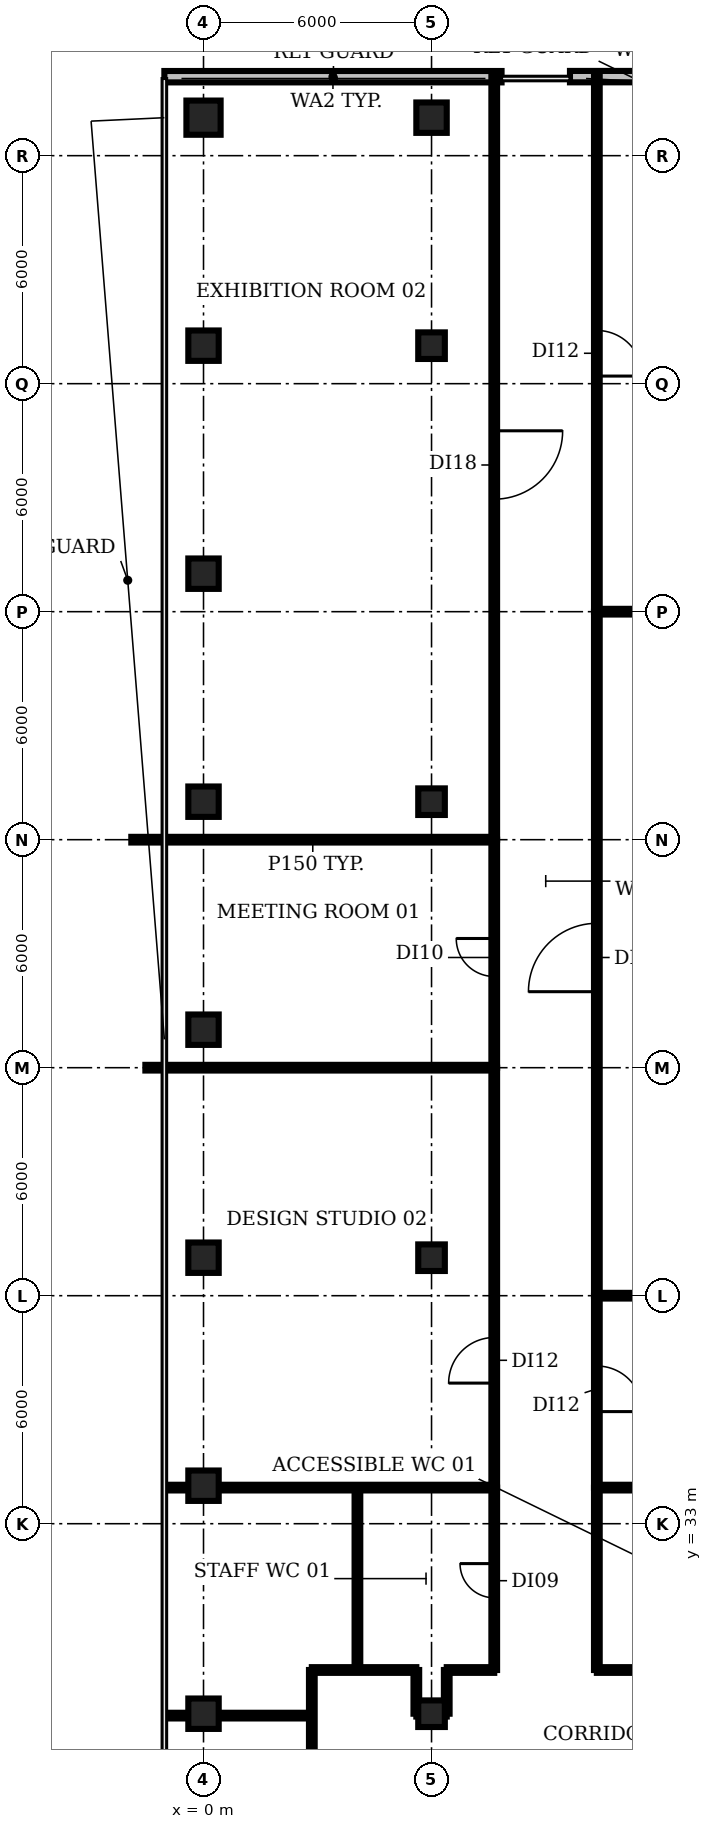
"""IFC4 building model, lengths in metres.
Left out: names, types, materials, properties, quantities, classifications, styles, units other than length and angle.
Written with IfcOpenShell. Run it as: python <this file> out.ifc"""

import sys

from ifc_helpers import new_model, si_unit, direction, frame, frame_2d, origin, origin_2d, place, context, subcontext, project, spatial, rectangle, circle, extrude, element, fill, save


model = new_model("IFC4")
c1 = context("Model", 3, precision=1e-05, world=origin(), true_north=direction((0.0, 1.0)))
c2 = subcontext(c1, "Body", "Model", "MODEL_VIEW")
j1 = project(units=[si_unit("LENGTHUNIT", "METRE"), si_unit("PLANEANGLEUNIT", "RADIAN")], contexts=[c1])
p1 = place(None, origin())
s1 = spatial("IfcSite", under=j1, at=p1, CompositionType="ELEMENT")
p2 = place(p1, origin())
s2 = spatial("IfcBuilding", under=s1, at=p2, CompositionType="ELEMENT")
p3 = place(p2, frame((0.0, 0.0, 213.8)))
s3 = spatial("IfcBuildingStorey", under=s2, at=p3, CompositionType="ELEMENT", Elevation=213.8)
for number, where, z_axis, x_axis in (
    (1, (0.0, 28.0, 0.0), (0.0, 0.0, 1.0), (1.0, 0.0, 0.0)),
    (2, (0.0, 34.0, 0.0), (0.0, 0.0, 1.0), (1.0, 0.0, 0.0)),
    (3, (0.0, 40.0, 0.0), (0.0, 0.0, 1.0), (1.0, 0.0, 0.0)),
    (4, (0.0, 46.0, 0.0), (0.0, 0.0, 1.0), (1.0, 0.0, 0.0)),
    (5, (0.0, 52.0, 0.0), (0.0, 0.0, 1.0), (1.0, 0.0, 0.0)),
    (6, (0.0, 58.0, 0.0), (0.0, 0.0, 1.0), (1.0, 0.0, 0.0)),
    (7, (0.0, 64.0, 0.0), (0.0, 0.0, 1.0), (1.0, 0.0, 0.0)),
):
    element("IfcColumn", number, at=place(p3, frame(where, z_axis=z_axis, x_axis=x_axis)), inside=s3, PredefinedType="COLUMN", context=c2, shape_type="SweptSolid", body=[
        extrude(rectangle(XDim=0.8, YDim=0.8, at=origin_2d()), origin(), (0.0, 0.0, 1.0), 3.85),
    ])
p4 = place(p3, frame((0.0, 70.0, 0.0), z_axis=(0.0, 0.0, 1.0), x_axis=(1.0, 0.0, 0.0)))
e8 = element("IfcColumn", 8, at=p4, inside=s3, PredefinedType="COLUMN", context=c2, shape_type="SweptSolid", body=[
    extrude(circle(Radius=0.45, at=origin_2d()), origin(), (0.0, 0.0, 1.0), 3.85),
])
for number, where, z_axis, x_axis in (
    (9, (6.0, 28.0, 0.0), (0.0, 0.0, 1.0), (1.0, 0.0, 0.0)),
    (10, (6.0, 40.0, 0.0), (0.0, 0.0, 1.0), (1.0, 0.0, 0.0)),
    (11, (6.0, 52.0, 0.0), (0.0, 0.0, 1.0), (1.0, 0.0, 0.0)),
    (12, (6.0, 64.0, 0.0), (0.0, 0.0, 1.0), (1.0, 0.0, 0.0)),
):
    element("IfcColumn", number, at=place(p3, frame(where, z_axis=z_axis, x_axis=x_axis)), inside=s3, PredefinedType="COLUMN", context=c2, shape_type="SweptSolid", body=[
        extrude(rectangle(XDim=0.7, YDim=0.7, at=origin_2d()), origin(), (0.0, 0.0, 1.0), 3.85),
    ])
p5 = place(p3, frame((6.0, 70.0, 0.0), z_axis=(0.0, 0.0, 1.0), x_axis=(1.0, 0.0, 0.0)))
e13 = element("IfcColumn", 13, at=p5, inside=s3, PredefinedType="COLUMN", context=c2, shape_type="SweptSolid", body=[
    extrude(rectangle(XDim=0.8, YDim=0.8, at=origin_2d()), origin(), (0.0, 0.0, 1.0), 3.85),
])
p6 = place(p3, frame((14.357, 71.08, 0.0), z_axis=(0.0, 0.0, 1.0), x_axis=(-1.0, 0.0, 0.0)))
e14 = element("IfcWall", 14, at=p6, inside=s3, PredefinedType="SOLIDWALL", context=c2, shape_type="SweptSolid", body=[
    extrude(rectangle(XDim=4.715, YDim=0.3, at=frame_2d((2.357, 0.0))), origin(), (0.0, 0.0, 1.0), 3.85),
])
p7 = place(p3, frame((7.843, 71.078, 0.0), z_axis=(0.0, 0.0, 1.0), x_axis=(-1.0, 0.0, 0.0)))
e15 = element("IfcWall", 15, at=p7, inside=s3, PredefinedType="SOLIDWALL", context=c2, shape_type="SweptSolid", body=[
    extrude(rectangle(XDim=8.873, YDim=0.3, at=frame_2d((4.436, 0.0))), origin(), (0.0, 0.0, 1.0), 3.85),
])
p8 = place(p3, frame((-1.9, 51.0, 0.0), z_axis=(0.0, 0.0, 1.0), x_axis=(1.0, 0.0, 0.0)))
e16 = element("IfcWall", 16, at=p8, inside=s3, PredefinedType="PARTITIONING", context=c2, shape_type="SweptSolid", body=[
    extrude(rectangle(XDim=9.55, YDim=0.15, at=frame_2d((4.775, 0.0))), origin(), (0.0, 0.0, 1.0), 2.88),
])
p9 = place(p3, frame((-1.53, 45.0, 0.0), z_axis=(0.0, 0.0, 1.0), x_axis=(1.0, 0.0, 0.0)))
e17 = element("IfcWall", 17, at=p9, inside=s3, PredefinedType="PARTITIONING", context=c2, shape_type="SweptSolid", body=[
    extrude(rectangle(XDim=9.18, YDim=0.15, at=frame_2d((4.59, 0.0))), origin(), (0.0, 0.0, 1.0), 2.88),
])
p10 = place(p3, frame((-0.965, 27.95, 0.0), z_axis=(0.0, 0.0, 1.0), x_axis=(1.0, 0.0, 0.0)))
e18 = element("IfcWall", 18, at=p10, inside=s3, PredefinedType="PARTITIONING", context=c2, shape_type="SweptSolid", body=[
    extrude(rectangle(XDim=3.815, YDim=0.15, at=frame_2d((1.908, 0.0))), origin(), (0.0, 0.0, 1.0), 2.88),
])
p11 = place(p3, frame((-0.98, 33.95, 0.0), z_axis=(0.0, 0.0, 1.0), x_axis=(1.0, 0.0, 0.0)))
e19 = element("IfcWall", 19, at=p11, inside=s3, PredefinedType="PARTITIONING", context=c2, shape_type="SweptSolid", body=[
    extrude(rectangle(XDim=8.63, YDim=0.15, at=frame_2d((4.315, 0.0))), origin(), (0.0, 0.0, 1.0), 2.88),
])
p12 = place(p3, frame((2.85, 25.25, 0.0), z_axis=(0.0, 0.0, 1.0), x_axis=(0.0, 1.0, 0.0)))
e20 = element("IfcWall", 20, at=p12, inside=s3, PredefinedType="PARTITIONING", context=c2, shape_type="SweptSolid", body=[
    extrude(rectangle(XDim=3.9, YDim=0.15, at=frame_2d((1.95, 0.0))), origin(), (0.0, 0.0, 1.0), 2.88),
])
p13 = place(p3, frame((2.85, 29.15, 0.0), z_axis=(0.0, 0.0, 1.0), x_axis=(1.0, 0.0, 0.0)))
e21 = element("IfcWall", 21, at=p13, inside=s3, PredefinedType="PARTITIONING", context=c2, shape_type="SweptSolid", body=[
    extrude(rectangle(XDim=2.75, YDim=0.15, at=frame_2d((1.375, 0.0))), origin(), (0.0, 0.0, 1.0), 2.88),
])
p14 = place(p3, frame((4.05, 29.15, 0.0), z_axis=(0.0, 0.0, 1.0), x_axis=(0.0, 1.0, 0.0)))
e22 = element("IfcWall", 22, at=p14, inside=s3, PredefinedType="PARTITIONING", context=c2, shape_type="SweptSolid", body=[
    extrude(rectangle(XDim=4.8, YDim=0.15, at=frame_2d((2.4, 0.0))), origin(), (0.0, 0.0, 1.0), 2.88),
])
p15 = place(p3, frame((5.6, 28.0, 0.0), z_axis=(0.0, 0.0, 1.0), x_axis=(0.0, 1.0, 0.0)))
e23 = element("IfcWall", 23, at=p15, inside=s3, PredefinedType="PARTITIONING", context=c2, shape_type="SweptSolid", body=[
    extrude(rectangle(XDim=1.15, YDim=0.15, at=frame_2d((0.575, 0.0))), origin(), (0.0, 0.0, 1.0), 2.88),
])
p16 = place(p3, frame((5.6, 28.0, 0.0), z_axis=(0.0, 0.0, 1.0), x_axis=(1.0, 0.0, 0.0)))
e24 = element("IfcWall", 24, at=p16, inside=s3, PredefinedType="PARTITIONING", context=c2, shape_type="SweptSolid", body=[
    extrude(rectangle(XDim=0.8, YDim=0.15, at=frame_2d((0.4, 0.0))), origin(), (0.0, 0.0, 1.0), 2.88),
])
p17 = place(p3, frame((6.4, 28.0, 0.0), z_axis=(0.0, 0.0, 1.0), x_axis=(0.0, 1.0, 0.0)))
e25 = element("IfcWall", 25, at=p17, inside=s3, PredefinedType="PARTITIONING", context=c2, shape_type="SweptSolid", body=[
    extrude(rectangle(XDim=1.15, YDim=0.15, at=frame_2d((0.575, 0.0))), origin(), (0.0, 0.0, 1.0), 2.88),
])
p18 = place(p3, frame((6.4, 29.15, 0.0), z_axis=(0.0, 0.0, 1.0), x_axis=(1.0, 0.0, 0.0)))
e26 = element("IfcWall", 26, at=p18, inside=s3, PredefinedType="PARTITIONING", context=c2, shape_type="SweptSolid", body=[
    extrude(rectangle(XDim=1.25, YDim=0.15, at=frame_2d((0.625, 0.0))), origin(), (0.0, 0.0, 1.0), 2.88),
])
p19 = place(p3, frame((7.65, 29.15, 0.0), z_axis=(0.0, 0.0, 1.0), x_axis=(0.0, 1.0, 0.0)))
e27 = element("IfcWall", 27, at=p19, inside=s3, PredefinedType="PARTITIONING", context=c2, shape_type="SweptSolid", body=[
    extrude(rectangle(XDim=4.8, YDim=0.15, at=frame_2d((2.4, 0.0))), origin(), (0.0, 0.0, 1.0), 2.88),
])
p20 = place(p19, frame((1.9, 0.0, 0.0)))
e28 = element("IfcOpeningElement", 28, at=p20, cuts=e27, PredefinedType="OPENING", context=c2, shape_type="SweptSolid", body=[
    extrude(rectangle(XDim=0.9, YDim=2.1, at=frame_2d((0.45, 1.05))), frame((0.0, 0.085, 0.0), z_axis=(0.0, -1.0, 0.0), x_axis=(1.0, 0.0, 0.0)), (0.0, 0.0, 1.0), 0.17),
])
p21 = place(p3, frame((7.65, 33.95, 0.0), z_axis=(0.0, 0.0, 1.0), x_axis=(0.0, 1.0, 0.0)))
e29 = element("IfcWall", 29, at=p21, inside=s3, PredefinedType="PARTITIONING", context=c2, shape_type="SweptSolid", body=[
    extrude(rectangle(XDim=11.05, YDim=0.15, at=frame_2d((5.525, 0.0))), origin(), (0.0, 0.0, 1.0), 2.88),
])
p22 = place(p21, frame((2.75, 0.0, 0.0)))
e30 = element("IfcOpeningElement", 30, at=p22, cuts=e29, PredefinedType="OPENING", context=c2, shape_type="SweptSolid", body=[
    extrude(rectangle(XDim=1.2, YDim=2.1, at=frame_2d((0.6, 1.05))), frame((0.0, 0.085, 0.0), z_axis=(0.0, -1.0, 0.0), x_axis=(1.0, 0.0, 0.0)), (0.0, 0.0, 1.0), 0.17),
])
p23 = place(p3, frame((7.65, 45.0, 0.0), z_axis=(0.0, 0.0, 1.0), x_axis=(0.0, 1.0, 0.0)))
e31 = element("IfcWall", 31, at=p23, inside=s3, PredefinedType="PARTITIONING", context=c2, shape_type="SweptSolid", body=[
    extrude(rectangle(XDim=6.0, YDim=0.15, at=frame_2d((3.0, 0.0))), origin(), (0.0, 0.0, 1.0), 2.88),
])
p24 = place(p23, frame((2.4, 0.0, 0.0)))
e32 = element("IfcOpeningElement", 32, at=p24, cuts=e31, PredefinedType="OPENING", context=c2, shape_type="SweptSolid", body=[
    extrude(rectangle(XDim=1.0, YDim=2.1, at=frame_2d((0.5, 1.05))), frame((0.0, 0.085, 0.0), z_axis=(0.0, -1.0, 0.0), x_axis=(1.0, 0.0, 0.0)), (0.0, 0.0, 1.0), 0.17),
])
p25 = place(p3, frame((7.65, 71.09, 0.0), z_axis=(0.0, 0.0, 1.0), x_axis=(0.0, -1.0, 0.0)))
e33 = element("IfcWall", 33, at=p25, inside=s3, PredefinedType="PARTITIONING", context=c2, shape_type="SweptSolid", body=[
    extrude(rectangle(XDim=20.09, YDim=0.15, at=frame_2d((10.045, 0.0))), origin(), (0.0, 0.0, 1.0), 2.88),
])
p26 = place(p25, frame((9.33, 0.0, 0.0)))
e34 = element("IfcOpeningElement", 34, at=p26, cuts=e33, PredefinedType="OPENING", context=c2, shape_type="SweptSolid", body=[
    extrude(rectangle(XDim=1.8, YDim=2.1, at=frame_2d((0.9, 1.05))), frame((0.0, 0.085, 0.0), z_axis=(0.0, -1.0, 0.0), x_axis=(1.0, 0.0, 0.0)), (0.0, 0.0, 1.0), 0.17),
])
p27 = place(p3, frame((10.35, 29.15, 0.0), z_axis=(0.0, 0.0, 1.0), x_axis=(0.0, 1.0, 0.0)))
e35 = element("IfcWall", 35, at=p27, inside=s3, PredefinedType="PARTITIONING", context=c2, shape_type="SweptSolid", body=[
    extrude(rectangle(XDim=4.8, YDim=0.15, at=frame_2d((2.4, 0.0))), origin(), (0.0, 0.0, 1.0), 2.88),
])
p28 = place(p3, frame((10.35, 29.15, 0.0), z_axis=(0.0, 0.0, 1.0), x_axis=(1.0, 0.0, 0.0)))
e36 = element("IfcWall", 36, at=p28, inside=s3, PredefinedType="PARTITIONING", context=c2, shape_type="SweptSolid", body=[
    extrude(rectangle(XDim=1.25, YDim=0.15, at=frame_2d((0.625, 0.0))), origin(), (0.0, 0.0, 1.0), 2.88),
])
p29 = place(p3, frame((10.35, 33.95, 0.0), z_axis=(0.0, 0.0, 1.0), x_axis=(1.0, 0.0, 0.0)))
e37 = element("IfcWall", 37, at=p29, inside=s3, PredefinedType="PARTITIONING", context=c2, shape_type="SweptSolid", body=[
    extrude(rectangle(XDim=1.242, YDim=0.15, at=frame_2d((0.621, 0.0))), origin(), (0.0, 0.0, 1.0), 2.88),
])
p30 = place(p3, frame((10.35, 39.0, 0.0), z_axis=(0.0, 0.0, 1.0), x_axis=(0.0, -1.0, 0.0)))
e38 = element("IfcWall", 38, at=p30, inside=s3, PredefinedType="PARTITIONING", context=c2, shape_type="SweptSolid", body=[
    extrude(rectangle(XDim=5.05, YDim=0.15, at=frame_2d((2.525, 0.0))), origin(), (0.0, 0.0, 1.0), 2.88),
])
p31 = place(p30, frame((1.85, 0.0, 0.0)))
e39 = element("IfcOpeningElement", 39, at=p31, cuts=e38, PredefinedType="OPENING", context=c2, shape_type="SweptSolid", body=[
    extrude(rectangle(XDim=1.2, YDim=2.1, at=frame_2d((0.6, 1.05))), frame((0.0, 0.085, 0.0), z_axis=(0.0, -1.0, 0.0), x_axis=(1.0, 0.0, 0.0)), (0.0, 0.0, 1.0), 0.17),
])
p32 = place(p3, frame((10.35, 39.0, 0.0), z_axis=(0.0, 0.0, 1.0), x_axis=(0.0, 1.0, 0.0)))
e40 = element("IfcWall", 40, at=p32, inside=s3, PredefinedType="PARTITIONING", context=c2, shape_type="SweptSolid", body=[
    extrude(rectangle(XDim=18.0, YDim=0.15, at=frame_2d((9.0, 0.0))), origin(), (0.0, 0.0, 1.0), 2.88),
])
p33 = place(p32, frame((8.0, 0.0, 0.0)))
e41 = element("IfcOpeningElement", 41, at=p33, cuts=e40, PredefinedType="OPENING", context=c2, shape_type="SweptSolid", body=[
    extrude(rectangle(XDim=1.8, YDim=2.1, at=frame_2d((0.9, 1.05))), frame((0.0, 0.085, 0.0), z_axis=(0.0, -1.0, 0.0), x_axis=(1.0, 0.0, 0.0)), (0.0, 0.0, 1.0), 0.17),
])
for number, where, z_axis, x_axis in (
    (42, (10.35, 39.0, 0.0), (0.0, 0.0, 1.0), (1.0, 0.0, 0.0)),
    (43, (10.35, 57.0, 0.0), (0.0, 0.0, 1.0), (1.0, 0.0, 0.0)),
):
    element("IfcWall", number, at=place(p3, frame(where, z_axis=z_axis, x_axis=x_axis)), inside=s3, PredefinedType="PARTITIONING", context=c2, shape_type="SweptSolid", body=[
        extrude(rectangle(XDim=14.63, YDim=0.15, at=frame_2d((7.315, 0.0))), origin(), (0.0, 0.0, 1.0), 2.88),
    ])
p34 = place(p3, frame((10.35, 71.09, 0.0), z_axis=(0.0, 0.0, 1.0), x_axis=(0.0, -1.0, 0.0)))
e44 = element("IfcWall", 44, at=p34, inside=s3, PredefinedType="PARTITIONING", context=c2, shape_type="SweptSolid", body=[
    extrude(rectangle(XDim=14.09, YDim=0.15, at=frame_2d((7.045, 0.0))), origin(), (0.0, 0.0, 1.0), 2.88),
])
p35 = place(p34, frame((6.69, 0.0, 0.0)))
e45 = element("IfcOpeningElement", 45, at=p35, cuts=e44, PredefinedType="OPENING", context=c2, shape_type="SweptSolid", body=[
    extrude(rectangle(XDim=1.2, YDim=2.1, at=frame_2d((0.6, 1.05))), frame((0.0, 0.085, 0.0), z_axis=(0.0, -1.0, 0.0), x_axis=(1.0, 0.0, 0.0)), (0.0, 0.0, 1.0), 0.17),
])
p36 = place(p20, origin())
e46 = element("IfcDoor", 46, at=p36, inside=s3, OperationType="SINGLE_SWING_RIGHT", PredefinedType="DOOR", context=c2, shape_type="SweptSolid", body=[
    extrude(rectangle(XDim=0.9, YDim=2.1, at=frame_2d((0.45, 1.05))), frame((0.0, 0.025, 0.0), z_axis=(0.0, -1.0, 0.0), x_axis=(1.0, 0.0, 0.0)), (0.0, 0.0, 1.0), 0.05),
])
fill(e28, e46)
p37 = place(p22, origin())
e47 = element("IfcDoor", 47, at=p37, inside=s3, OperationType="SINGLE_SWING_LEFT", PredefinedType="DOOR", context=c2, shape_type="SweptSolid", body=[
    extrude(rectangle(XDim=1.2, YDim=2.1, at=frame_2d((0.6, 1.05))), frame((0.0, 0.025, 0.0), z_axis=(0.0, -1.0, 0.0), x_axis=(1.0, 0.0, 0.0)), (0.0, 0.0, 1.0), 0.05),
])
fill(e30, e47)
p38 = place(p24, origin())
e48 = element("IfcDoor", 48, at=p38, inside=s3, OperationType="SINGLE_SWING_RIGHT", PredefinedType="DOOR", context=c2, shape_type="SweptSolid", body=[
    extrude(rectangle(XDim=1.0, YDim=2.1, at=frame_2d((0.5, 1.05))), frame((0.0, 0.025, 0.0), z_axis=(0.0, -1.0, 0.0), x_axis=(1.0, 0.0, 0.0)), (0.0, 0.0, 1.0), 0.05),
])
fill(e32, e48)
p39 = place(p26, origin())
e49 = element("IfcDoor", 49, at=p39, inside=s3, OperationType="SINGLE_SWING_LEFT", PredefinedType="DOOR", context=c2, shape_type="SweptSolid", body=[
    extrude(rectangle(XDim=1.8, YDim=2.1, at=frame_2d((0.9, 1.05))), frame((0.0, 0.025, 0.0), z_axis=(0.0, -1.0, 0.0), x_axis=(1.0, 0.0, 0.0)), (0.0, 0.0, 1.0), 0.05),
])
fill(e34, e49)
p40 = place(p31, origin())
e50 = element("IfcDoor", 50, at=p40, inside=s3, OperationType="SINGLE_SWING_RIGHT", PredefinedType="DOOR", context=c2, shape_type="SweptSolid", body=[
    extrude(rectangle(XDim=1.2, YDim=2.1, at=frame_2d((0.6, 1.05))), frame((0.0, 0.025, 0.0), z_axis=(0.0, -1.0, 0.0), x_axis=(1.0, 0.0, 0.0)), (0.0, 0.0, 1.0), 0.05),
])
fill(e39, e50)
p41 = place(p33, origin())
e51 = element("IfcDoor", 51, at=p41, inside=s3, OperationType="SINGLE_SWING_LEFT", PredefinedType="DOOR", context=c2, shape_type="SweptSolid", body=[
    extrude(rectangle(XDim=1.8, YDim=2.1, at=frame_2d((0.9, 1.05))), frame((0.0, 0.025, 0.0), z_axis=(0.0, -1.0, 0.0), x_axis=(1.0, 0.0, 0.0)), (0.0, 0.0, 1.0), 0.05),
])
fill(e41, e51)
p42 = place(p35, origin())
e52 = element("IfcDoor", 52, at=p42, inside=s3, OperationType="SINGLE_SWING_RIGHT", PredefinedType="DOOR", context=c2, shape_type="SweptSolid", body=[
    extrude(rectangle(XDim=1.2, YDim=2.1, at=frame_2d((0.6, 1.05))), frame((0.0, 0.025, 0.0), z_axis=(0.0, -1.0, 0.0), x_axis=(1.0, 0.0, 0.0)), (0.0, 0.0, 1.0), 0.05),
])
fill(e45, e52)
save(model, sys.argv[1])
